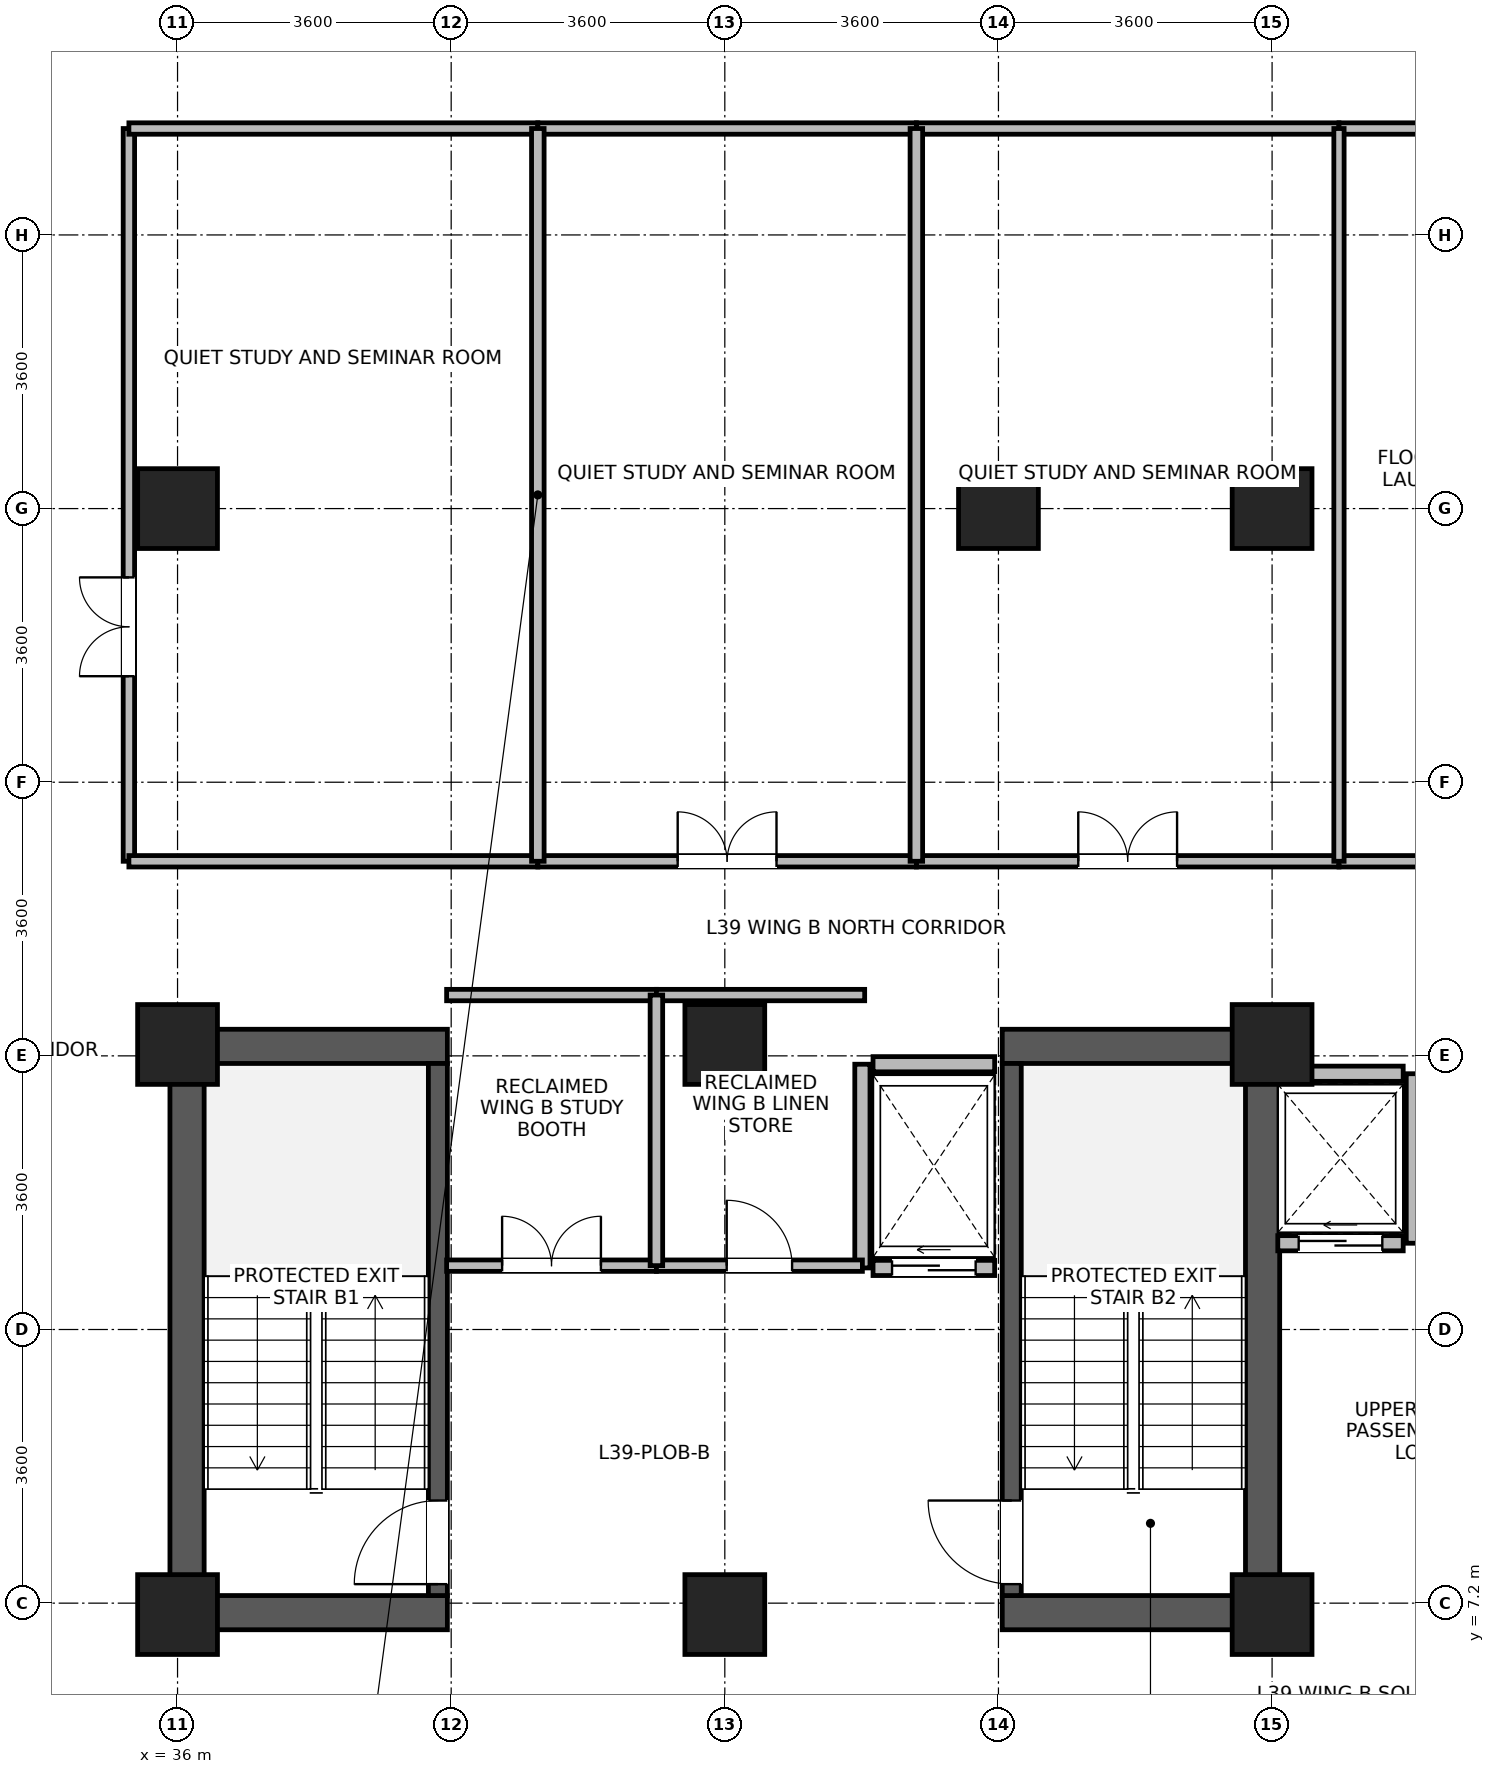
"""IFC4 building model, lengths in metres.
Left out: names, types, materials, properties, quantities, classifications, styles, units other than length and angle.
Written with IfcOpenShell. Run it as: python <this file> out.ifc"""

import sys

from ifc_helpers import new_model, si_unit, direction, frame, frame_2d, origin, origin_2d, place, context, subcontext, project, spatial, rectangle, extrude, source, transform, mapped, element, fill, save


model = new_model("IFC4")
c1 = context("Model", 3, precision=1e-05, world=origin(), true_north=direction((0.0, 1.0)))
c2 = subcontext(c1, "Body", "Model", "MODEL_VIEW")
j1 = project(units=[si_unit("LENGTHUNIT", "METRE"), si_unit("PLANEANGLEUNIT", "RADIAN")], contexts=[c1])
p1 = place(None, origin())
s1 = spatial("IfcSite", under=j1, at=p1, CompositionType="ELEMENT")
p2 = place(p1, origin())
s2 = spatial("IfcBuilding", under=s1, at=p2, CompositionType="ELEMENT")
p3 = place(p2, frame((0.0, 0.0, 155.0)))
s3 = spatial("IfcBuildingStorey", under=s2, at=p3, CompositionType="ELEMENT", Elevation=155.0)
for number, where, z_axis, x_axis in (
    (1, (36.125, 6.85, 0.0), (0.0, 0.0, 1.0), (0.0, 1.0, 0.0)),
    (2, (50.275, 6.85, 0.0), (0.0, 0.0, 1.0), (0.0, 1.0, 0.0)),
):
    element("IfcWall", number, at=place(p3, frame(where, z_axis=z_axis, x_axis=x_axis)), inside=s3, PredefinedType="SHEAR", context=c2, shape_type="SweptSolid", body=[
        extrude(rectangle(XDim=7.9, YDim=0.45, at=frame_2d((3.95, 0.0))), origin(), (0.0, 0.0, 1.0), 3.46),
    ])
for number, where, z_axis, x_axis in (
    (3, (36.35, 7.075, 0.0), (0.0, 0.0, 1.0), (1.0, 0.0, 0.0)),
    (4, (46.85, 7.075, 0.0), (0.0, 0.0, 1.0), (1.0, 0.0, 0.0)),
    (5, (36.35, 14.525, 0.0), (0.0, 0.0, 1.0), (1.0, 0.0, 0.0)),
    (6, (46.85, 14.525, 0.0), (0.0, 0.0, 1.0), (1.0, 0.0, 0.0)),
):
    element("IfcWall", number, at=place(p3, frame(where, z_axis=z_axis, x_axis=x_axis)), inside=s3, PredefinedType="SHEAR", context=c2, shape_type="SweptSolid", body=[
        extrude(rectangle(XDim=3.2, YDim=0.45, at=frame_2d((1.6, 0.0))), origin(), (0.0, 0.0, 1.0), 3.46),
    ])
p4 = place(p3, frame((39.425, 7.3, 0.0), z_axis=(0.0, 0.0, 1.0), x_axis=(0.0, 1.0, 0.0)))
e7 = element("IfcWall", 7, at=p4, inside=s3, PredefinedType="SHEAR", context=c2, shape_type="SweptSolid", body=[
    extrude(rectangle(XDim=7.0, YDim=0.25, at=frame_2d((3.5, 0.0))), origin(), (0.0, 0.0, 1.0), 3.46),
])
p5 = place(p4, frame((0.15, 0.0, 0.0)))
e8 = element("IfcOpeningElement", 8, at=p5, cuts=e7, PredefinedType="OPENING", context=c2, shape_type="SweptSolid", body=[
    extrude(rectangle(XDim=1.1, YDim=2.08, at=frame_2d((0.55, 1.04))), frame((0.0, 0.135, 0.0), z_axis=(0.0, -1.0, 0.0), x_axis=(1.0, 0.0, 0.0)), (0.0, 0.0, 1.0), 0.27),
])
p6 = place(p3, frame((46.975, 7.3, 0.0), z_axis=(0.0, 0.0, 1.0), x_axis=(0.0, 1.0, 0.0)))
e9 = element("IfcWall", 9, at=p6, inside=s3, PredefinedType="SHEAR", context=c2, shape_type="SweptSolid", body=[
    extrude(rectangle(XDim=7.0, YDim=0.25, at=frame_2d((3.5, 0.0))), origin(), (0.0, 0.0, 1.0), 3.46),
])
p7 = place(p6, frame((0.15, 0.0, 0.0)))
e10 = element("IfcOpeningElement", 10, at=p7, cuts=e9, PredefinedType="OPENING", context=c2, shape_type="SweptSolid", body=[
    extrude(rectangle(XDim=1.1, YDim=2.08, at=frame_2d((0.55, 1.04))), frame((0.0, 0.135, 0.0), z_axis=(0.0, -1.0, 0.0), x_axis=(1.0, 0.0, 0.0)), (0.0, 0.0, 1.0), 0.27),
])
m1 = source(origin(), c2, "Body", "SweptSolid", [
    extrude(rectangle(XDim=1.05, YDim=1.05, at=origin_2d()), origin(), (0.0, 0.0, 1.0), 3.7),
])
for number, where, z_axis, x_axis in (
    (11, (36.0, 21.6, 0.0), (0.0, 0.0, 1.0), (1.0, 0.0, 0.0)),
    (12, (46.8, 21.6, 0.0), (0.0, 0.0, 1.0), (1.0, 0.0, 0.0)),
    (13, (36.0, 7.05, 0.0), (0.0, 0.0, 1.0), (1.0, 0.0, 0.0)),
    (14, (36.0, 14.55, 0.0), (0.0, 0.0, 1.0), (1.0, 0.0, 0.0)),
    (15, (43.2, 7.05, 0.0), (0.0, 0.0, 1.0), (1.0, 0.0, 0.0)),
    (16, (43.2, 14.55, 0.0), (0.0, 0.0, 1.0), (1.0, 0.0, 0.0)),
    (17, (50.4, 7.05, 0.0), (0.0, 0.0, 1.0), (1.0, 0.0, 0.0)),
    (18, (50.4, 14.55, 0.0), (0.0, 0.0, 1.0), (1.0, 0.0, 0.0)),
    (19, (50.4, 21.6, 0.0), (0.0, 0.0, 1.0), (1.0, 0.0, 0.0)),
):
    element("IfcColumn", number, at=place(p3, frame(where, z_axis=z_axis, x_axis=x_axis)), inside=s3, PredefinedType="COLUMN", context=c2, shape_type="MappedRepresentation", body=[
        mapped(m1, transform((0.0, 0.0, 0.0), x_axis=(1.0, 0.0, 0.0), y_axis=(0.0, 1.0, 0.0), z_axis=(0.0, 0.0, 1.0), scale=1.0)),
    ])
p8 = place(p3, frame((50.475, 11.935, 0.0), z_axis=(0.0, 0.0, 1.0), x_axis=(1.0, 0.0, 0.0)))
e20 = element("IfcWall", 20, at=p8, inside=s3, PredefinedType="PARTITIONING", context=c2, shape_type="SweptSolid", body=[
    extrude(rectangle(XDim=1.65, YDim=0.2, at=frame_2d((0.825, 0.0))), origin(), (0.0, 0.0, 1.0), 3.44),
])
p9 = place(p8, frame((0.275, 0.0, 0.0)))
e21 = element("IfcOpeningElement", 21, at=p9, cuts=e20, PredefinedType="OPENING", context=c2, shape_type="SweptSolid", body=[
    extrude(rectangle(XDim=1.1, YDim=2.12, at=frame_2d((0.55, 1.06))), frame((0.0, 0.11, 0.0), z_axis=(0.0, -1.0, 0.0), x_axis=(1.0, 0.0, 0.0)), (0.0, 0.0, 1.0), 0.22),
])
p10 = place(p3, frame((50.475, 14.165, 0.0), z_axis=(0.0, 0.0, 1.0), x_axis=(1.0, 0.0, 0.0)))
e22 = element("IfcWall", 22, at=p10, inside=s3, PredefinedType="PARTITIONING", context=c2, shape_type="SweptSolid", body=[
    extrude(rectangle(XDim=1.65, YDim=0.2, at=frame_2d((0.825, 0.0))), origin(), (0.0, 0.0, 1.0), 3.44),
])
p11 = place(p3, frame((52.265, 11.935, 0.0), z_axis=(0.0, 0.0, 1.0), x_axis=(0.0, 1.0, 0.0)))
e23 = element("IfcWall", 23, at=p11, inside=s3, PredefinedType="PARTITIONING", context=c2, shape_type="SweptSolid", body=[
    extrude(rectangle(XDim=2.23, YDim=0.2, at=frame_2d((1.115, 0.0))), origin(), (0.0, 0.0, 1.0), 3.44),
])
p12 = place(p3, frame((45.15, 11.61, 0.0), z_axis=(0.0, 0.0, 1.0), x_axis=(1.0, 0.0, 0.0)))
e24 = element("IfcWall", 24, at=p12, inside=s3, PredefinedType="PARTITIONING", context=c2, shape_type="SweptSolid", body=[
    extrude(rectangle(XDim=1.6, YDim=0.2, at=frame_2d((0.8, 0.0))), origin(), (0.0, 0.0, 1.0), 3.44),
])
p13 = place(p12, frame((0.25, 0.0, 0.0)))
e25 = element("IfcOpeningElement", 25, at=p13, cuts=e24, PredefinedType="OPENING", context=c2, shape_type="SweptSolid", body=[
    extrude(rectangle(XDim=1.1, YDim=2.12, at=frame_2d((0.55, 1.06))), frame((0.0, 0.11, 0.0), z_axis=(0.0, -1.0, 0.0), x_axis=(1.0, 0.0, 0.0)), (0.0, 0.0, 1.0), 0.22),
])
p14 = place(p3, frame((45.15, 14.29, 0.0), z_axis=(0.0, 0.0, 1.0), x_axis=(1.0, 0.0, 0.0)))
e26 = element("IfcWall", 26, at=p14, inside=s3, PredefinedType="PARTITIONING", context=c2, shape_type="SweptSolid", body=[
    extrude(rectangle(XDim=1.6, YDim=0.2, at=frame_2d((0.8, 0.0))), origin(), (0.0, 0.0, 1.0), 2.44),
])
p15 = place(p3, frame((45.01, 11.61, 0.0), z_axis=(0.0, 0.0, 1.0), x_axis=(0.0, 1.0, 0.0)))
e27 = element("IfcWall", 27, at=p15, inside=s3, PredefinedType="PARTITIONING", context=c2, shape_type="SweptSolid", body=[
    extrude(rectangle(XDim=2.68, YDim=0.2, at=frame_2d((1.34, 0.0))), origin(), (0.0, 0.0, 1.0), 3.44),
])
p16 = place(p3, frame((35.36, 16.96, 0.0), z_axis=(0.0, 0.0, 1.0), x_axis=(0.0, 1.0, 0.0)))
e28 = element("IfcWall", 28, at=p16, inside=s3, PredefinedType="PARTITIONING", context=c2, shape_type="SweptSolid", body=[
    extrude(rectangle(XDim=9.64, YDim=0.15, at=frame_2d((4.82, 0.0))), origin(), (0.0, 0.0, 1.0), 3.44),
])
p17 = place(p16, frame((2.435, 0.0, 0.0)))
e29 = element("IfcOpeningElement", 29, at=p17, cuts=e28, PredefinedType="OPENING", context=c2, shape_type="SweptSolid", body=[
    extrude(rectangle(XDim=1.3, YDim=2.12, at=frame_2d((0.65, 1.06))), frame((0.0, 0.085, 0.0), z_axis=(0.0, -1.0, 0.0), x_axis=(1.0, 0.0, 0.0)), (0.0, 0.0, 1.0), 0.17),
])
p18 = place(p3, frame((45.72, 16.96, 0.0), z_axis=(0.0, 0.0, 1.0), x_axis=(1.0, 0.0, 0.0)))
e30 = element("IfcWall", 30, at=p18, inside=s3, PredefinedType="PARTITIONING", context=c2, shape_type="SweptSolid", body=[
    extrude(rectangle(XDim=5.56, YDim=0.15, at=frame_2d((2.78, 0.0))), origin(), (0.0, 0.0, 1.0), 3.44),
])
p19 = place(p18, frame((2.13, 0.0, 0.0)))
e31 = element("IfcOpeningElement", 31, at=p19, cuts=e30, PredefinedType="OPENING", context=c2, shape_type="SweptSolid", body=[
    extrude(rectangle(XDim=1.3, YDim=2.12, at=frame_2d((0.65, 1.06))), frame((0.0, 0.085, 0.0), z_axis=(0.0, -1.0, 0.0), x_axis=(1.0, 0.0, 0.0)), (0.0, 0.0, 1.0), 0.17),
])
p20 = place(p3, frame((45.72, 26.6, 0.0), z_axis=(0.0, 0.0, 1.0), x_axis=(1.0, 0.0, 0.0)))
e32 = element("IfcWall", 32, at=p20, inside=s3, PredefinedType="PARTITIONING", context=c2, shape_type="SweptSolid", body=[
    extrude(rectangle(XDim=5.56, YDim=0.15, at=frame_2d((2.78, 0.0))), origin(), (0.0, 0.0, 1.0), 3.44),
])
for number, where, z_axis, x_axis in (
    (33, (35.36, 16.96, 0.0), (0.0, 0.0, 1.0), (1.0, 0.0, 0.0)),
    (34, (35.36, 26.6, 0.0), (0.0, 0.0, 1.0), (1.0, 0.0, 0.0)),
):
    element("IfcWall", number, at=place(p3, frame(where, z_axis=z_axis, x_axis=x_axis)), inside=s3, PredefinedType="PARTITIONING", context=c2, shape_type="SweptSolid", body=[
        extrude(rectangle(XDim=5.38, YDim=0.15, at=frame_2d((2.69, 0.0))), origin(), (0.0, 0.0, 1.0), 3.44),
    ])
p21 = place(p3, frame((40.74, 16.96, 0.0), z_axis=(0.0, 0.0, 1.0), x_axis=(1.0, 0.0, 0.0)))
e35 = element("IfcWall", 35, at=p21, inside=s3, PredefinedType="PARTITIONING", context=c2, shape_type="SweptSolid", body=[
    extrude(rectangle(XDim=4.98, YDim=0.15, at=frame_2d((2.49, 0.0))), origin(), (0.0, 0.0, 1.0), 3.44),
])
p22 = place(p21, frame((1.84, 0.0, 0.0)))
e36 = element("IfcOpeningElement", 36, at=p22, cuts=e35, PredefinedType="OPENING", context=c2, shape_type="SweptSolid", body=[
    extrude(rectangle(XDim=1.3, YDim=2.12, at=frame_2d((0.65, 1.06))), frame((0.0, 0.085, 0.0), z_axis=(0.0, -1.0, 0.0), x_axis=(1.0, 0.0, 0.0)), (0.0, 0.0, 1.0), 0.17),
])
p23 = place(p3, frame((40.74, 26.6, 0.0), z_axis=(0.0, 0.0, 1.0), x_axis=(1.0, 0.0, 0.0)))
e37 = element("IfcWall", 37, at=p23, inside=s3, PredefinedType="PARTITIONING", context=c2, shape_type="SweptSolid", body=[
    extrude(rectangle(XDim=4.98, YDim=0.15, at=frame_2d((2.49, 0.0))), origin(), (0.0, 0.0, 1.0), 3.44),
])
p24 = place(p3, frame((51.28, 16.96, 0.0), z_axis=(0.0, 0.0, 1.0), x_axis=(1.0, 0.0, 0.0)))
e38 = element("IfcWall", 38, at=p24, inside=s3, PredefinedType="PARTITIONING", context=c2, shape_type="SweptSolid", body=[
    extrude(rectangle(XDim=3.088, YDim=0.15, at=frame_2d((1.544, 0.0))), origin(), (0.0, 0.0, 1.0), 3.44),
])
p25 = place(p24, frame((1.119, 0.0, 0.0)))
e39 = element("IfcOpeningElement", 39, at=p25, cuts=e38, PredefinedType="OPENING", context=c2, shape_type="SweptSolid", body=[
    extrude(rectangle(XDim=0.85, YDim=2.04, at=frame_2d((0.425, 1.02))), frame((0.0, 0.085, 0.0), z_axis=(0.0, -1.0, 0.0), x_axis=(1.0, 0.0, 0.0)), (0.0, 0.0, 1.0), 0.17),
])
p26 = place(p3, frame((51.28, 26.6, 0.0), z_axis=(0.0, 0.0, 1.0), x_axis=(1.0, 0.0, 0.0)))
e40 = element("IfcWall", 40, at=p26, inside=s3, PredefinedType="PARTITIONING", context=c2, shape_type="SweptSolid", body=[
    extrude(rectangle(XDim=3.088, YDim=0.15, at=frame_2d((1.544, 0.0))), origin(), (0.0, 0.0, 1.0), 3.44),
])
p27 = place(p3, frame((39.54, 11.64, 0.0), z_axis=(0.0, 0.0, 1.0), x_axis=(1.0, 0.0, 0.0)))
e41 = element("IfcWall", 41, at=p27, inside=s3, PredefinedType="PARTITIONING", context=c2, shape_type="SweptSolid", body=[
    extrude(rectangle(XDim=2.76, YDim=0.15, at=frame_2d((1.38, 0.0))), origin(), (0.0, 0.0, 1.0), 3.44),
])
p28 = place(p27, frame((0.73, 0.0, 0.0)))
e42 = element("IfcOpeningElement", 42, at=p28, cuts=e41, PredefinedType="OPENING", context=c2, shape_type="SweptSolid", body=[
    extrude(rectangle(XDim=1.3, YDim=2.12, at=frame_2d((0.65, 1.06))), frame((0.0, 0.085, 0.0), z_axis=(0.0, -1.0, 0.0), x_axis=(1.0, 0.0, 0.0)), (0.0, 0.0, 1.0), 0.17),
])
p29 = place(p3, frame((39.54, 15.2, 0.0), z_axis=(0.0, 0.0, 1.0), x_axis=(1.0, 0.0, 0.0)))
e43 = element("IfcWall", 43, at=p29, inside=s3, PredefinedType="PARTITIONING", context=c2, shape_type="SweptSolid", body=[
    extrude(rectangle(XDim=2.76, YDim=0.15, at=frame_2d((1.38, 0.0))), origin(), (0.0, 0.0, 1.0), 3.44),
])
p30 = place(p3, frame((42.3, 11.64, 0.0), z_axis=(0.0, 0.0, 1.0), x_axis=(1.0, 0.0, 0.0)))
e44 = element("IfcWall", 44, at=p30, inside=s3, PredefinedType="PARTITIONING", context=c2, shape_type="SweptSolid", body=[
    extrude(rectangle(XDim=2.71, YDim=0.15, at=frame_2d((1.355, 0.0))), origin(), (0.0, 0.0, 1.0), 3.44),
])
p31 = place(p30, frame((0.925, 0.0, 0.0)))
e45 = element("IfcOpeningElement", 45, at=p31, cuts=e44, PredefinedType="OPENING", context=c2, shape_type="SweptSolid", body=[
    extrude(rectangle(XDim=0.86, YDim=2.02, at=frame_2d((0.43, 1.01))), frame((0.0, 0.085, 0.0), z_axis=(0.0, -1.0, 0.0), x_axis=(1.0, 0.0, 0.0)), (0.0, 0.0, 1.0), 0.17),
])
p32 = place(p3, frame((42.3, 15.2, 0.0), z_axis=(0.0, 0.0, 1.0), x_axis=(1.0, 0.0, 0.0)))
e46 = element("IfcWall", 46, at=p32, inside=s3, PredefinedType="PARTITIONING", context=c2, shape_type="SweptSolid", body=[
    extrude(rectangle(XDim=2.74, YDim=0.15, at=frame_2d((1.37, 0.0))), origin(), (0.0, 0.0, 1.0), 3.44),
])
for number, where, z_axis, x_axis in (
    (47, (40.74, 16.96, 0.0), (0.0, 0.0, 1.0), (0.0, 1.0, 0.0)),
    (48, (45.72, 16.96, 0.0), (0.0, 0.0, 1.0), (0.0, 1.0, 0.0)),
):
    element("IfcWall", number, at=place(p3, frame(where, z_axis=z_axis, x_axis=x_axis)), inside=s3, PredefinedType="PARTITIONING", context=c2, shape_type="SweptSolid", body=[
        extrude(rectangle(XDim=9.64, YDim=0.165, at=frame_2d((4.82, 0.0))), origin(), (0.0, 0.0, 1.0), 3.44),
    ])
p33 = place(p3, frame((51.28, 16.96, 0.0), z_axis=(0.0, 0.0, 1.0), x_axis=(0.0, 1.0, 0.0)))
e49 = element("IfcWall", 49, at=p33, inside=s3, PredefinedType="PARTITIONING", context=c2, shape_type="SweptSolid", body=[
    extrude(rectangle(XDim=9.64, YDim=0.135, at=frame_2d((4.82, 0.0))), origin(), (0.0, 0.0, 1.0), 3.44),
])
p34 = place(p3, frame((42.3, 11.64, 0.0), z_axis=(0.0, 0.0, 1.0), x_axis=(0.0, 1.0, 0.0)))
e50 = element("IfcWall", 50, at=p34, inside=s3, PredefinedType="PARTITIONING", context=c2, shape_type="SweptSolid", body=[
    extrude(rectangle(XDim=3.56, YDim=0.165, at=frame_2d((1.78, 0.0))), origin(), (0.0, 0.0, 1.0), 3.44),
])
p35 = place(p5, origin())
e51 = element("IfcDoor", 51, at=p35, inside=s3, OperationType="SINGLE_SWING_LEFT", PredefinedType="DOOR", context=c2, shape_type="SweptSolid", body=[
    extrude(rectangle(XDim=1.1, YDim=2.08, at=frame_2d((0.55, 1.04))), frame((0.0, 0.025, 0.0), z_axis=(0.0, -1.0, 0.0), x_axis=(1.0, 0.0, 0.0)), (0.0, 0.0, 1.0), 0.05),
])
fill(e8, e51)
p36 = place(p7, origin())
e52 = element("IfcDoor", 52, at=p36, inside=s3, OperationType="SINGLE_SWING_RIGHT", PredefinedType="DOOR", context=c2, shape_type="SweptSolid", body=[
    extrude(rectangle(XDim=1.1, YDim=2.08, at=frame_2d((0.55, 1.04))), frame((0.0, 0.025, 0.0), z_axis=(0.0, -1.0, 0.0), x_axis=(1.0, 0.0, 0.0)), (0.0, 0.0, 1.0), 0.05),
])
fill(e10, e52)
p37 = place(p9, origin())
e53 = element("IfcDoor", 53, at=p37, inside=s3, OperationType="SLIDING_TO_LEFT", PredefinedType="DOOR", context=c2, shape_type="SweptSolid", body=[
    extrude(rectangle(XDim=1.1, YDim=2.12, at=frame_2d((0.55, 1.06))), frame((0.0, 0.025, 0.0), z_axis=(0.0, -1.0, 0.0), x_axis=(1.0, 0.0, 0.0)), (0.0, 0.0, 1.0), 0.05),
])
fill(e21, e53)
p38 = place(p13, origin())
e54 = element("IfcDoor", 54, at=p38, inside=s3, OperationType="SLIDING_TO_LEFT", PredefinedType="DOOR", context=c2, shape_type="SweptSolid", body=[
    extrude(rectangle(XDim=1.1, YDim=2.12, at=frame_2d((0.55, 1.06))), frame((0.0, 0.025, 0.0), z_axis=(0.0, -1.0, 0.0), x_axis=(1.0, 0.0, 0.0)), (0.0, 0.0, 1.0), 0.05),
])
fill(e25, e54)
p39 = place(p17, origin())
e55 = element("IfcDoor", 55, at=p39, inside=s3, OperationType="DOUBLE_DOOR_SINGLE_SWING", PredefinedType="DOOR", context=c2, shape_type="SweptSolid", body=[
    extrude(rectangle(XDim=1.3, YDim=2.12, at=frame_2d((0.65, 1.06))), frame((0.0, 0.025, 0.0), z_axis=(0.0, -1.0, 0.0), x_axis=(1.0, 0.0, 0.0)), (0.0, 0.0, 1.0), 0.05),
])
fill(e29, e55)
p40 = place(p19, origin())
e56 = element("IfcDoor", 56, at=p40, inside=s3, OperationType="DOUBLE_DOOR_SINGLE_SWING", PredefinedType="DOOR", context=c2, shape_type="SweptSolid", body=[
    extrude(rectangle(XDim=1.3, YDim=2.12, at=frame_2d((0.65, 1.06))), frame((0.0, 0.025, 0.0), z_axis=(0.0, -1.0, 0.0), x_axis=(1.0, 0.0, 0.0)), (0.0, 0.0, 1.0), 0.05),
])
fill(e31, e56)
p41 = place(p22, origin())
e57 = element("IfcDoor", 57, at=p41, inside=s3, OperationType="DOUBLE_DOOR_SINGLE_SWING", PredefinedType="DOOR", context=c2, shape_type="SweptSolid", body=[
    extrude(rectangle(XDim=1.3, YDim=2.12, at=frame_2d((0.65, 1.06))), frame((0.0, 0.025, 0.0), z_axis=(0.0, -1.0, 0.0), x_axis=(1.0, 0.0, 0.0)), (0.0, 0.0, 1.0), 0.05),
])
fill(e36, e57)
p42 = place(p28, origin())
e58 = element("IfcDoor", 58, at=p42, inside=s3, OperationType="DOUBLE_DOOR_SINGLE_SWING", PredefinedType="DOOR", context=c2, shape_type="SweptSolid", body=[
    extrude(rectangle(XDim=1.3, YDim=2.12, at=frame_2d((0.65, 1.06))), frame((0.0, 0.025, 0.0), z_axis=(0.0, -1.0, 0.0), x_axis=(1.0, 0.0, 0.0)), (0.0, 0.0, 1.0), 0.05),
])
fill(e42, e58)
p43 = place(p31, origin())
e59 = element("IfcDoor", 59, at=p43, inside=s3, OperationType="SINGLE_SWING_LEFT", PredefinedType="DOOR", context=c2, shape_type="SweptSolid", body=[
    extrude(rectangle(XDim=0.86, YDim=2.02, at=frame_2d((0.43, 1.01))), frame((0.0, 0.025, 0.0), z_axis=(0.0, -1.0, 0.0), x_axis=(1.0, 0.0, 0.0)), (0.0, 0.0, 1.0), 0.05),
])
fill(e45, e59)
save(model, sys.argv[1])
